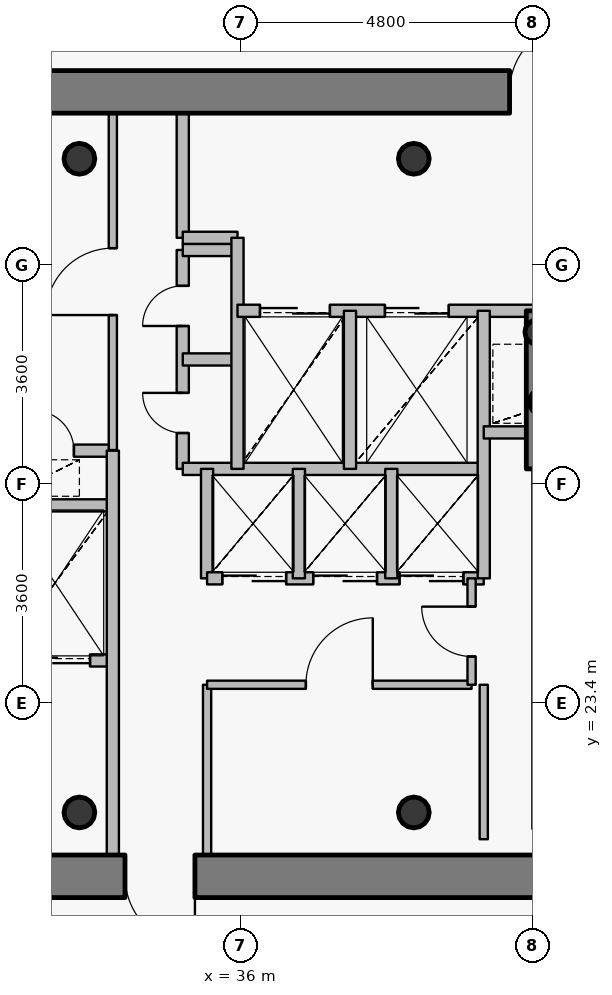
"""IFC4 building model, lengths in metres.
Left out: names, types, materials, properties, quantities, classifications, styles, units other than length and angle.
Written with IfcOpenShell. Run it as: python <this file> out.ifc"""

import sys

from ifc_helpers import new_model, si_unit, direction, frame, frame_2d, origin, origin_2d, place, context, subcontext, project, spatial, rectangle, hollow_circle, extrude, source, transform, mapped, element, fill, save


model = new_model("IFC4")
c1 = context("Model", 3, precision=1e-05, world=origin(), true_north=direction((0.0, 1.0)))
c2 = subcontext(c1, "Body", "Model", "MODEL_VIEW")
j1 = project(units=[si_unit("LENGTHUNIT", "METRE"), si_unit("PLANEANGLEUNIT", "RADIAN")], contexts=[c1])
p1 = place(None, origin())
s1 = spatial("IfcSite", under=j1, at=p1, CompositionType="ELEMENT")
p2 = place(p1, origin())
s2 = spatial("IfcBuilding", under=s1, at=p2, CompositionType="ELEMENT")
p3 = place(p2, frame((0.0, 0.0, 276.75)))
s3 = spatial("IfcBuildingStorey", under=s2, at=p3, CompositionType="ELEMENT", Elevation=276.75)
for number, where, z_axis, x_axis in (
    (1, (33.35, 21.6, 0.0), (0.0, 0.0, 1.0), (1.0, 0.0, 0.0)),
    (2, (38.85, 21.6, 0.0), (0.0, 0.0, 1.0), (1.0, 0.0, 0.0)),
    (3, (38.85, 32.35, 0.0), (0.0, 0.0, 1.0), (1.0, 0.0, 0.0)),
    (4, (33.35, 32.35, 0.0), (0.0, 0.0, 1.0), (1.0, 0.0, 0.0)),
):
    element("IfcColumn", number, at=place(p3, frame(where, z_axis=z_axis, x_axis=x_axis)), inside=s3, PredefinedType="COLUMN", context=c2, shape_type="SweptSolid", body=[
        extrude(hollow_circle(Radius=0.254, WallThickness=0.02, at=origin_2d()), origin(), (0.0, 0.0, 1.0), 3.75),
    ])
for number, where, z_axis, x_axis in (
    (5, (40.95, 28.35, 0.0), (0.0, 0.0, 1.0), (1.0, 0.0, 0.0)),
    (6, (40.88, 29.5, 0.0), (0.0, 0.0, 1.0), (1.0, 0.0, 0.0)),
):
    element("IfcColumn", number, at=place(p3, frame(where, z_axis=z_axis, x_axis=x_axis)), inside=s3, PredefinedType="COLUMN", context=c2, shape_type="SweptSolid", body=[
        extrude(hollow_circle(Radius=0.203, WallThickness=0.016, at=origin_2d()), origin(), (0.0, 0.0, 1.0), 3.75),
    ])
p4 = place(p3, frame((27.65, 33.45, 0.0), z_axis=(0.0, 0.0, 1.0), x_axis=(1.0, 0.0, 0.0)))
e7 = element("IfcWall", 7, at=p4, inside=s3, PredefinedType="SHEAR", context=c2, shape_type="SweptSolid", body=[
    extrude(rectangle(XDim=16.7, YDim=0.7, at=frame_2d((8.35, 0.0))), origin(), (0.0, 0.0, 1.0), 3.05),
])
p5 = place(p4, frame((12.775, 0.0, 0.0)))
e8 = element("IfcOpeningElement", 8, at=p5, cuts=e7, PredefinedType="OPENING", context=c2, shape_type="SweptSolid", body=[
    extrude(rectangle(XDim=1.15, YDim=2.15, at=origin_2d()), frame((0.575, 0.36, 1.075), z_axis=(0.0, -1.0, 0.0), x_axis=(1.0, 0.0, 0.0)), (0.0, 0.0, 1.0), 0.72),
])
p6 = place(p3, frame((44.35, 20.55, 0.0), z_axis=(0.0, 0.0, 1.0), x_axis=(-1.0, 0.0, 0.0)))
e9 = element("IfcWall", 9, at=p6, inside=s3, PredefinedType="SHEAR", context=c2, shape_type="SweptSolid", body=[
    extrude(rectangle(XDim=16.7, YDim=0.7, at=frame_2d((8.35, 0.0))), origin(), (0.0, 0.0, 1.0), 3.05),
])
p7 = place(p6, frame((12.925, 0.0, 0.0)))
e10 = element("IfcOpeningElement", 10, at=p7, cuts=e9, PredefinedType="OPENING", context=c2, shape_type="SweptSolid", body=[
    extrude(rectangle(XDim=1.15, YDim=2.15, at=origin_2d()), frame((0.575, 0.36, 1.075), z_axis=(0.0, -1.0, 0.0), x_axis=(1.0, 0.0, 0.0)), (0.0, 0.0, 1.0), 0.72),
])
p8 = place(p6, frame((9.1, 0.0, 0.0)))
e11 = element("IfcOpeningElement", 11, at=p8, cuts=e9, PredefinedType="OPENING", context=c2, shape_type="SweptSolid", body=[
    extrude(rectangle(XDim=1.15, YDim=2.15, at=origin_2d()), frame((0.575, 0.36, 1.075), z_axis=(0.0, -1.0, 0.0), x_axis=(1.0, 0.0, 0.0)), (0.0, 0.0, 1.0), 0.72),
])
p9 = place(p3, frame((40.9, 27.25, 0.0), z_axis=(0.0, 0.0, 1.0), x_axis=(0.0, 1.0, 0.0)))
e12 = element("IfcWall", 12, at=p9, inside=s3, PredefinedType="SHEAR", context=c2, shape_type="SweptSolid", body=[
    extrude(rectangle(XDim=2.6, YDim=0.4, at=frame_2d((1.3, 0.0))), origin(), (0.0, 0.0, 1.0), 3.1),
])
p10 = place(p3, frame((31.1, 27.55, 0.0), z_axis=(0.0, 0.0, 1.0), x_axis=(1.0, 0.0, 0.0)))
e13 = element("IfcWall", 13, at=p10, inside=s3, PredefinedType="PARTITIONING", context=c2, shape_type="SweptSolid", body=[
    extrude(rectangle(XDim=2.8, YDim=0.2, at=frame_2d((1.4, 0.0))), origin(), (0.0, 0.0, 1.0), 3.085),
])
p11 = place(p10, frame((1.5, 0.0, 0.0)))
e14 = element("IfcOpeningElement", 14, at=p11, cuts=e13, PredefinedType="OPENING", context=c2, shape_type="SweptSolid", body=[
    extrude(rectangle(XDim=0.66, YDim=2.05, at=origin_2d()), frame((0.33, 0.11, 1.025), z_axis=(0.0, -1.0, 0.0), x_axis=(1.0, 0.0, 0.0)), (0.0, 0.0, 1.0), 0.22),
])
p12 = place(p3, frame((32.0, 24.1, 0.0), z_axis=(0.0, 0.0, 1.0), x_axis=(1.0, 0.0, 0.0)))
e15 = element("IfcWall", 15, at=p12, inside=s3, PredefinedType="PARTITIONING", context=c2, shape_type="SweptSolid", body=[
    extrude(rectangle(XDim=1.9, YDim=0.2, at=frame_2d((0.95, 0.0))), origin(), (0.0, 0.0, 1.0), 3.085),
])
p13 = place(p12, frame((0.375, 0.0, 0.0)))
e16 = element("IfcOpeningElement", 16, at=p13, cuts=e15, PredefinedType="OPENING", context=c2, shape_type="SweptSolid", body=[
    extrude(rectangle(XDim=1.15, YDim=2.15, at=origin_2d()), frame((0.575, 0.11, 1.075), z_axis=(0.0, -1.0, 0.0), x_axis=(1.0, 0.0, 0.0)), (0.0, 0.0, 1.0), 0.22),
])
p14 = place(p3, frame((32.0, 26.65, 0.0), z_axis=(0.0, 0.0, 1.0), x_axis=(1.0, 0.0, 0.0)))
e17 = element("IfcWall", 17, at=p14, inside=s3, PredefinedType="PARTITIONING", context=c2, shape_type="SweptSolid", body=[
    extrude(rectangle(XDim=1.9, YDim=0.2, at=frame_2d((0.95, 0.0))), origin(), (0.0, 0.0, 1.0), 3.085),
])
p15 = place(p3, frame((33.9, 20.9, 0.0), z_axis=(0.0, 0.0, 1.0), x_axis=(0.0, 1.0, 0.0)))
e18 = element("IfcWall", 18, at=p15, inside=s3, PredefinedType="PARTITIONING", context=c2, shape_type="SweptSolid", body=[
    extrude(rectangle(XDim=6.65, YDim=0.2, at=frame_2d((3.325, 0.0))), origin(), (0.0, 0.0, 1.0), 3.085),
])
p16 = place(p3, frame((33.9, 27.56, 0.0), z_axis=(0.0, 0.0, 1.0), x_axis=(0.0, 1.0, 0.0)))
e19 = element("IfcWall", 19, at=p16, inside=s3, PredefinedType="PARTITIONING", context=c2, shape_type="SweptSolid", body=[
    extrude(rectangle(XDim=5.54, YDim=0.135, at=frame_2d((2.77, 0.0))), origin(), (0.0, 0.0, 1.0), 3.085),
])
p17 = place(p16, frame((2.22, 0.0, 0.0)))
e20 = element("IfcOpeningElement", 20, at=p17, cuts=e19, PredefinedType="OPENING", context=c2, shape_type="SweptSolid", body=[
    extrude(rectangle(XDim=1.1, YDim=2.15, at=origin_2d()), frame((0.55, 0.078, 1.075), z_axis=(0.0, -1.0, 0.0), x_axis=(1.0, 0.0, 0.0)), (0.0, 0.0, 1.0), 0.155),
])
p18 = place(p3, frame((35.05, 27.25, 0.0), z_axis=(0.0, 0.0, 1.0), x_axis=(0.0, 1.0, 0.0)))
e21 = element("IfcWall", 21, at=p18, inside=s3, PredefinedType="PARTITIONING", context=c2, shape_type="SweptSolid", body=[
    extrude(rectangle(XDim=3.6, YDim=0.2, at=frame_2d((1.8, 0.0))), origin(), (0.0, 0.0, 1.0), 3.5),
])
p19 = place(p18, frame((0.59, 0.0, 0.0)))
e22 = element("IfcOpeningElement", 22, at=p19, cuts=e21, PredefinedType="OPENING", context=c2, shape_type="SweptSolid", body=[
    extrude(rectangle(XDim=0.66, YDim=2.05, at=origin_2d()), frame((0.33, 0.11, 1.025), z_axis=(0.0, -1.0, 0.0), x_axis=(1.0, 0.0, 0.0)), (0.0, 0.0, 1.0), 0.22),
])
p20 = place(p18, frame((2.35, 0.0, 0.0)))
e23 = element("IfcOpeningElement", 23, at=p20, cuts=e21, PredefinedType="OPENING", context=c2, shape_type="SweptSolid", body=[
    extrude(rectangle(XDim=0.66, YDim=2.05, at=origin_2d()), frame((0.33, 0.11, 1.025), z_axis=(0.0, -1.0, 0.0), x_axis=(1.0, 0.0, 0.0)), (0.0, 0.0, 1.0), 0.22),
])
p21 = place(p3, frame((35.05, 27.25, 0.0), z_axis=(0.0, 0.0, 1.0), x_axis=(1.0, 0.0, 0.0)))
e24 = element("IfcWall", 24, at=p21, inside=s3, PredefinedType="PARTITIONING", context=c2, shape_type="SweptSolid", body=[
    extrude(rectangle(XDim=4.95, YDim=0.2, at=frame_2d((2.475, 0.0))), origin(), (0.0, 0.0, 1.0), 3.085),
])
for number, where, z_axis, x_axis in (
    (25, (35.05, 29.05, 0.0), (0.0, 0.0, 1.0), (1.0, 0.0, 0.0)),
    (26, (35.05, 30.85, 0.0), (0.0, 0.0, 1.0), (1.0, 0.0, 0.0)),
):
    element("IfcWall", number, at=place(p3, frame(where, z_axis=z_axis, x_axis=x_axis)), inside=s3, PredefinedType="PARTITIONING", context=c2, shape_type="SweptSolid", body=[
        extrude(rectangle(XDim=0.9, YDim=0.2, at=frame_2d((0.45, 0.0))), origin(), (0.0, 0.0, 1.0), 3.5),
    ])
p22 = place(p3, frame((35.05, 31.05, 0.0), z_axis=(0.0, 0.0, 1.0), x_axis=(0.0, 1.0, 0.0)))
e27 = element("IfcWall", 27, at=p22, inside=s3, PredefinedType="PARTITIONING", context=c2, shape_type="SweptSolid", body=[
    extrude(rectangle(XDim=2.05, YDim=0.2, at=frame_2d((1.025, 0.0))), origin(), (0.0, 0.0, 1.0), 3.085),
])
p23 = place(p3, frame((35.05, 31.05, 0.0), z_axis=(0.0, 0.0, 1.0), x_axis=(1.0, 0.0, 0.0)))
e28 = element("IfcWall", 28, at=p23, inside=s3, PredefinedType="PARTITIONING", context=c2, shape_type="SweptSolid", body=[
    extrude(rectangle(XDim=0.9, YDim=0.2, at=frame_2d((0.45, 0.0))), origin(), (0.0, 0.0, 1.0), 3.5),
])
p24 = place(p3, frame((35.45, 20.9, 0.0), z_axis=(0.0, 0.0, 1.0), x_axis=(0.0, 1.0, 0.0)))
e29 = element("IfcWall", 29, at=p24, inside=s3, PredefinedType="PARTITIONING", context=c2, shape_type="SweptSolid", body=[
    extrude(rectangle(XDim=2.8, YDim=0.135, at=frame_2d((1.4, 0.0))), origin(), (0.0, 0.0, 1.0), 3.085),
])
p25 = place(p3, frame((35.45, 23.7, 0.0), z_axis=(0.0, 0.0, 1.0), x_axis=(1.0, 0.0, 0.0)))
e30 = element("IfcWall", 30, at=p25, inside=s3, PredefinedType="PARTITIONING", context=c2, shape_type="SweptSolid", body=[
    extrude(rectangle(XDim=4.35, YDim=0.135, at=frame_2d((2.175, 0.0))), origin(), (0.0, 0.0, 1.0), 3.085),
])
p26 = place(p25, frame((1.625, 0.0, 0.0)))
e31 = element("IfcOpeningElement", 31, at=p26, cuts=e30, PredefinedType="OPENING", context=c2, shape_type="SweptSolid", body=[
    extrude(rectangle(XDim=1.1, YDim=2.15, at=origin_2d()), frame((0.55, 0.078, 1.075), z_axis=(0.0, -1.0, 0.0), x_axis=(1.0, 0.0, 0.0)), (0.0, 0.0, 1.0), 0.155),
])
p27 = place(p3, frame((35.45, 25.45, 0.0), z_axis=(0.0, 0.0, 1.0), x_axis=(0.0, 1.0, 0.0)))
e32 = element("IfcWall", 32, at=p27, inside=s3, PredefinedType="PARTITIONING", context=c2, shape_type="SweptSolid", body=[
    extrude(rectangle(XDim=1.8, YDim=0.2, at=frame_2d((0.9, 0.0))), origin(), (0.0, 0.0, 1.0), 3.5),
])
p28 = place(p3, frame((35.45, 25.45, 0.0), z_axis=(0.0, 0.0, 1.0), x_axis=(1.0, 0.0, 0.0)))
e33 = element("IfcWall", 33, at=p28, inside=s3, PredefinedType="PARTITIONING", context=c2, shape_type="SweptSolid", body=[
    extrude(rectangle(XDim=4.55, YDim=0.2, at=frame_2d((2.275, 0.0))), origin(), (0.0, 0.0, 1.0), 3.085),
])
p29 = place(p28, frame((0.25, 0.0, 0.0)))
e34 = element("IfcOpeningElement", 34, at=p29, cuts=e33, PredefinedType="OPENING", context=c2, shape_type="SweptSolid", body=[
    extrude(rectangle(XDim=1.05, YDim=2.15, at=origin_2d()), frame((0.525, 0.11, 1.075), z_axis=(0.0, -1.0, 0.0), x_axis=(1.0, 0.0, 0.0)), (0.0, 0.0, 1.0), 0.22),
])
p30 = place(p28, frame((1.745, 0.0, 0.0)))
e35 = element("IfcOpeningElement", 35, at=p30, cuts=e33, PredefinedType="OPENING", context=c2, shape_type="SweptSolid", body=[
    extrude(rectangle(XDim=1.05, YDim=2.15, at=origin_2d()), frame((0.525, 0.11, 1.075), z_axis=(0.0, -1.0, 0.0), x_axis=(1.0, 0.0, 0.0)), (0.0, 0.0, 1.0), 0.22),
])
p31 = place(p28, frame((3.165, 0.0, 0.0)))
e36 = element("IfcOpeningElement", 36, at=p31, cuts=e33, PredefinedType="OPENING", context=c2, shape_type="SweptSolid", body=[
    extrude(rectangle(XDim=1.05, YDim=2.15, at=origin_2d()), frame((0.525, 0.11, 1.075), z_axis=(0.0, -1.0, 0.0), x_axis=(1.0, 0.0, 0.0)), (0.0, 0.0, 1.0), 0.22),
])
p32 = place(p3, frame((35.95, 27.25, 0.0), z_axis=(0.0, 0.0, 1.0), x_axis=(0.0, 1.0, 0.0)))
e37 = element("IfcWall", 37, at=p32, inside=s3, PredefinedType="PARTITIONING", context=c2, shape_type="SweptSolid", body=[
    extrude(rectangle(XDim=3.8, YDim=0.2, at=frame_2d((1.9, 0.0))), origin(), (0.0, 0.0, 1.0), 3.5),
])
p33 = place(p3, frame((35.95, 29.85, 0.0), z_axis=(0.0, 0.0, 1.0), x_axis=(1.0, 0.0, 0.0)))
e38 = element("IfcWall", 38, at=p33, inside=s3, PredefinedType="PARTITIONING", context=c2, shape_type="SweptSolid", body=[
    extrude(rectangle(XDim=8.49, YDim=0.2, at=frame_2d((4.245, 0.0))), origin(), (0.0, 0.0, 1.0), 3.085),
])
p34 = place(p33, frame((6.1, 0.0, 0.0)))
e39 = element("IfcOpeningElement", 39, at=p34, cuts=e38, PredefinedType="OPENING", context=c2, shape_type="SweptSolid", body=[
    extrude(rectangle(XDim=1.2, YDim=2.15, at=origin_2d()), frame((0.6, 0.11, 1.075), z_axis=(0.0, -1.0, 0.0), x_axis=(1.0, 0.0, 0.0)), (0.0, 0.0, 1.0), 0.22),
])
p35 = place(p33, frame((0.37, 0.0, 0.0)))
e40 = element("IfcOpeningElement", 40, at=p35, cuts=e38, PredefinedType="OPENING", context=c2, shape_type="SweptSolid", body=[
    extrude(rectangle(XDim=1.15, YDim=2.15, at=origin_2d()), frame((0.575, 0.11, 1.075), z_axis=(0.0, -1.0, 0.0), x_axis=(1.0, 0.0, 0.0)), (0.0, 0.0, 1.0), 0.22),
])
p36 = place(p33, frame((2.425, 0.0, 0.0)))
e41 = element("IfcOpeningElement", 41, at=p36, cuts=e38, PredefinedType="OPENING", context=c2, shape_type="SweptSolid", body=[
    extrude(rectangle(XDim=1.05, YDim=2.15, at=origin_2d()), frame((0.525, 0.11, 1.075), z_axis=(0.0, -1.0, 0.0), x_axis=(1.0, 0.0, 0.0)), (0.0, 0.0, 1.0), 0.22),
])
p37 = place(p3, frame((36.96, 25.45, 0.0), z_axis=(0.0, 0.0, 1.0), x_axis=(0.0, 1.0, 0.0)))
e42 = element("IfcWall", 42, at=p37, inside=s3, PredefinedType="PARTITIONING", context=c2, shape_type="SweptSolid", body=[
    extrude(rectangle(XDim=1.8, YDim=0.2, at=frame_2d((0.9, 0.0))), origin(), (0.0, 0.0, 1.0), 3.5),
])
p38 = place(p3, frame((37.8, 27.25, 0.0), z_axis=(0.0, 0.0, 1.0), x_axis=(0.0, 1.0, 0.0)))
e43 = element("IfcWall", 43, at=p38, inside=s3, PredefinedType="PARTITIONING", context=c2, shape_type="SweptSolid", body=[
    extrude(rectangle(XDim=2.6, YDim=0.2, at=frame_2d((1.3, 0.0))), origin(), (0.0, 0.0, 1.0), 3.5),
])
p39 = place(p3, frame((38.48, 25.45, 0.0), z_axis=(0.0, 0.0, 1.0), x_axis=(0.0, 1.0, 0.0)))
e44 = element("IfcWall", 44, at=p39, inside=s3, PredefinedType="PARTITIONING", context=c2, shape_type="SweptSolid", body=[
    extrude(rectangle(XDim=1.8, YDim=0.2, at=frame_2d((0.9, 0.0))), origin(), (0.0, 0.0, 1.0), 3.5),
])
p40 = place(p3, frame((39.8, 23.7, 0.0), z_axis=(0.0, 0.0, 1.0), x_axis=(0.0, 1.0, 0.0)))
e45 = element("IfcWall", 45, at=p40, inside=s3, PredefinedType="PARTITIONING", context=c2, shape_type="SweptSolid", body=[
    extrude(rectangle(XDim=1.75, YDim=0.135, at=frame_2d((0.875, 0.0))), origin(), (0.0, 0.0, 1.0), 3.5),
])
p41 = place(p40, frame((0.465, 0.0, 0.0)))
e46 = element("IfcOpeningElement", 46, at=p41, cuts=e45, PredefinedType="OPENING", context=c2, shape_type="SweptSolid", body=[
    extrude(rectangle(XDim=0.82, YDim=2.1, at=origin_2d()), frame((0.41, 0.078, 1.05), z_axis=(0.0, -1.0, 0.0), x_axis=(1.0, 0.0, 0.0)), (0.0, 0.0, 1.0), 0.155),
])
p42 = place(p3, frame((40.0, 25.45, 0.0), z_axis=(0.0, 0.0, 1.0), x_axis=(0.0, 1.0, 0.0)))
e47 = element("IfcWall", 47, at=p42, inside=s3, PredefinedType="PARTITIONING", context=c2, shape_type="SweptSolid", body=[
    extrude(rectangle(XDim=4.4, YDim=0.2, at=frame_2d((2.2, 0.0))), origin(), (0.0, 0.0, 1.0), 3.5),
])
p43 = place(p3, frame((40.0, 27.85, 0.0), z_axis=(0.0, 0.0, 1.0), x_axis=(1.0, 0.0, 0.0)))
e48 = element("IfcWall", 48, at=p43, inside=s3, PredefinedType="PARTITIONING", context=c2, shape_type="SweptSolid", body=[
    extrude(rectangle(XDim=0.9, YDim=0.2, at=frame_2d((0.45, 0.0))), origin(), (0.0, 0.0, 1.0), 3.5),
])
p44 = place(p3, frame((40.9, 21.33, 0.0), z_axis=(0.0, 0.0, 1.0), x_axis=(0.0, 1.0, 0.0)))
e49 = element("IfcWall", 49, at=p44, inside=s3, PredefinedType="PARTITIONING", context=c2, shape_type="SweptSolid", body=[
    extrude(rectangle(XDim=5.91, YDim=0.2, at=frame_2d((2.955, 0.0))), origin(), (0.0, 0.0, 1.0), 3.035),
])
p45 = place(p3, frame((40.0, 23.7, 0.0), z_axis=(0.0, 0.0, 1.0), x_axis=(0.0, -1.0, 0.0)))
e50 = element("IfcWall", 50, at=p45, inside=s3, PredefinedType="PARTITIONING", context=c2, shape_type="SweptSolid", body=[
    extrude(rectangle(XDim=2.54, YDim=0.135, at=frame_2d((1.27, 0.0))), origin(), (0.0, 0.0, 1.0), 3.035),
])
m1 = source(origin(), c2, "Body", "SweptSolid", [
    extrude(rectangle(XDim=1.15, YDim=2.15, at=origin_2d()), frame((0.575, 0.025, 1.075), z_axis=(0.0, -1.0, 0.0), x_axis=(1.0, 0.0, 0.0)), (0.0, 0.0, 1.0), 0.05),
])
p46 = place(p5, origin())
e51 = element("IfcDoor", 51, at=p46, inside=s3, OperationType="SINGLE_SWING_RIGHT", PredefinedType="DOOR", context=c2, shape_type="MappedRepresentation", body=[
    mapped(m1, transform((0.0, 0.0, 0.0), x_axis=(1.0, 0.0, 0.0), y_axis=(0.0, 1.0, 0.0), z_axis=(0.0, 0.0, 1.0), scale=1.0)),
])
fill(e8, e51)
p47 = place(p8, origin())
e52 = element("IfcDoor", 52, at=p47, inside=s3, OperationType="SINGLE_SWING_LEFT", PredefinedType="DOOR", context=c2, shape_type="MappedRepresentation", body=[
    mapped(m1, transform((0.0, 0.0, 0.0), x_axis=(1.0, 0.0, 0.0), y_axis=(0.0, 1.0, 0.0), z_axis=(0.0, 0.0, 1.0), scale=1.0)),
])
fill(e11, e52)
m2 = source(origin(), c2, "Body", "SweptSolid", [
    extrude(rectangle(XDim=1.15, YDim=2.15, at=origin_2d()), frame((0.575, 0.025, 1.075), z_axis=(0.0, -1.0, 0.0), x_axis=(1.0, 0.0, 0.0)), (0.0, 0.0, 1.0), 0.05),
])
p48 = place(p35, origin())
e53 = element("IfcDoor", 53, at=p48, inside=s3, OperationType="DOUBLE_DOOR_SLIDING", PredefinedType="USERDEFINED", context=c2, shape_type="MappedRepresentation", body=[
    mapped(m2, transform((0.0, 0.0, 0.0), x_axis=(1.0, 0.0, 0.0), y_axis=(0.0, 1.0, 0.0), z_axis=(0.0, 0.0, 1.0), scale=1.0)),
])
fill(e40, e53)
p49 = place(p13, origin())
e54 = element("IfcDoor", 54, at=p49, inside=s3, OperationType="DOUBLE_DOOR_SLIDING", PredefinedType="USERDEFINED", context=c2, shape_type="MappedRepresentation", body=[
    mapped(m2, transform((0.0, 0.0, 0.0), x_axis=(1.0, 0.0, 0.0), y_axis=(0.0, 1.0, 0.0), z_axis=(0.0, 0.0, 1.0), scale=1.0)),
])
fill(e16, e54)
m3 = source(origin(), c2, "Body", "SweptSolid", [
    extrude(rectangle(XDim=1.05, YDim=2.15, at=origin_2d()), frame((0.525, 0.025, 1.075), z_axis=(0.0, -1.0, 0.0), x_axis=(1.0, 0.0, 0.0)), (0.0, 0.0, 1.0), 0.05),
])
p50 = place(p36, origin())
e55 = element("IfcDoor", 55, at=p50, inside=s3, OperationType="DOUBLE_DOOR_SLIDING", PredefinedType="USERDEFINED", context=c2, shape_type="MappedRepresentation", body=[
    mapped(m3, transform((0.0, 0.0, 0.0), x_axis=(1.0, 0.0, 0.0), y_axis=(0.0, 1.0, 0.0), z_axis=(0.0, 0.0, 1.0), scale=1.0)),
])
fill(e41, e55)
p51 = place(p29, origin())
e56 = element("IfcDoor", 56, at=p51, inside=s3, OperationType="DOUBLE_DOOR_SLIDING", PredefinedType="USERDEFINED", context=c2, shape_type="MappedRepresentation", body=[
    mapped(m3, transform((0.0, 0.0, 0.0), x_axis=(1.0, 0.0, 0.0), y_axis=(0.0, 1.0, 0.0), z_axis=(0.0, 0.0, 1.0), scale=1.0)),
])
fill(e34, e56)
p52 = place(p30, origin())
e57 = element("IfcDoor", 57, at=p52, inside=s3, OperationType="DOUBLE_DOOR_SLIDING", PredefinedType="USERDEFINED", context=c2, shape_type="MappedRepresentation", body=[
    mapped(m3, transform((0.0, 0.0, 0.0), x_axis=(1.0, 0.0, 0.0), y_axis=(0.0, 1.0, 0.0), z_axis=(0.0, 0.0, 1.0), scale=1.0)),
])
fill(e35, e57)
p53 = place(p31, origin())
e58 = element("IfcDoor", 58, at=p53, inside=s3, OperationType="DOUBLE_DOOR_SLIDING", PredefinedType="USERDEFINED", context=c2, shape_type="MappedRepresentation", body=[
    mapped(m3, transform((0.0, 0.0, 0.0), x_axis=(1.0, 0.0, 0.0), y_axis=(0.0, 1.0, 0.0), z_axis=(0.0, 0.0, 1.0), scale=1.0)),
])
fill(e36, e58)
m4 = source(origin(), c2, "Body", "SweptSolid", [
    extrude(rectangle(XDim=0.66, YDim=2.05, at=origin_2d()), frame((0.33, 0.025, 1.025), z_axis=(0.0, -1.0, 0.0), x_axis=(1.0, 0.0, 0.0)), (0.0, 0.0, 1.0), 0.05),
])
p54 = place(p19, origin())
e59 = element("IfcDoor", 59, at=p54, inside=s3, OperationType="SINGLE_SWING_RIGHT", PredefinedType="USERDEFINED", context=c2, shape_type="MappedRepresentation", body=[
    mapped(m4, transform((0.0, 0.0, 0.0), x_axis=(1.0, 0.0, 0.0), y_axis=(0.0, 1.0, 0.0), z_axis=(0.0, 0.0, 1.0), scale=1.0)),
])
fill(e22, e59)
p55 = place(p20, origin())
e60 = element("IfcDoor", 60, at=p55, inside=s3, OperationType="SINGLE_SWING_LEFT", PredefinedType="USERDEFINED", context=c2, shape_type="MappedRepresentation", body=[
    mapped(m4, transform((0.0, 0.0, 0.0), x_axis=(1.0, 0.0, 0.0), y_axis=(0.0, 1.0, 0.0), z_axis=(0.0, 0.0, 1.0), scale=1.0)),
])
fill(e23, e60)
m5 = source(origin(), c2, "Body", "SweptSolid", [
    extrude(rectangle(XDim=1.1, YDim=2.15, at=origin_2d()), frame((0.55, 0.025, 1.075), z_axis=(0.0, -1.0, 0.0), x_axis=(1.0, 0.0, 0.0)), (0.0, 0.0, 1.0), 0.05),
])
p56 = place(p26, origin())
e61 = element("IfcDoor", 61, at=p56, inside=s3, OperationType="SINGLE_SWING_RIGHT", PredefinedType="DOOR", context=c2, shape_type="MappedRepresentation", body=[
    mapped(m5, transform((0.0, 0.0, 0.0), x_axis=(1.0, 0.0, 0.0), y_axis=(0.0, 1.0, 0.0), z_axis=(0.0, 0.0, 1.0), scale=1.0)),
])
fill(e31, e61)
p57 = place(p17, origin())
e62 = element("IfcDoor", 62, at=p57, inside=s3, OperationType="SINGLE_SWING_LEFT", PredefinedType="DOOR", context=c2, shape_type="MappedRepresentation", body=[
    mapped(m5, transform((0.0, 0.0, 0.0), x_axis=(1.0, 0.0, 0.0), y_axis=(0.0, 1.0, 0.0), z_axis=(0.0, 0.0, 1.0), scale=1.0)),
])
fill(e20, e62)
m6 = source(origin(), c2, "Body", "SweptSolid", [
    extrude(rectangle(XDim=0.82, YDim=2.1, at=origin_2d()), frame((0.41, 0.025, 1.05), z_axis=(0.0, -1.0, 0.0), x_axis=(1.0, 0.0, 0.0)), (0.0, 0.0, 1.0), 0.05),
])
p58 = place(p41, origin())
e63 = element("IfcDoor", 63, at=p58, inside=s3, OperationType="SINGLE_SWING_RIGHT", PredefinedType="DOOR", context=c2, shape_type="MappedRepresentation", body=[
    mapped(m6, transform((0.0, 0.0, 0.0), x_axis=(1.0, 0.0, 0.0), y_axis=(0.0, 1.0, 0.0), z_axis=(0.0, 0.0, 1.0), scale=1.0)),
])
fill(e46, e63)
p59 = place(p11, origin())
e64 = element("IfcDoor", 64, at=p59, inside=s3, OperationType="SINGLE_SWING_LEFT", PredefinedType="USERDEFINED", context=c2, shape_type="MappedRepresentation", body=[
    mapped(m4, transform((0.0, 0.0, 0.0), x_axis=(1.0, 0.0, 0.0), y_axis=(0.0, 1.0, 0.0), z_axis=(0.0, 0.0, 1.0), scale=1.0)),
])
fill(e14, e64)
save(model, sys.argv[1])
